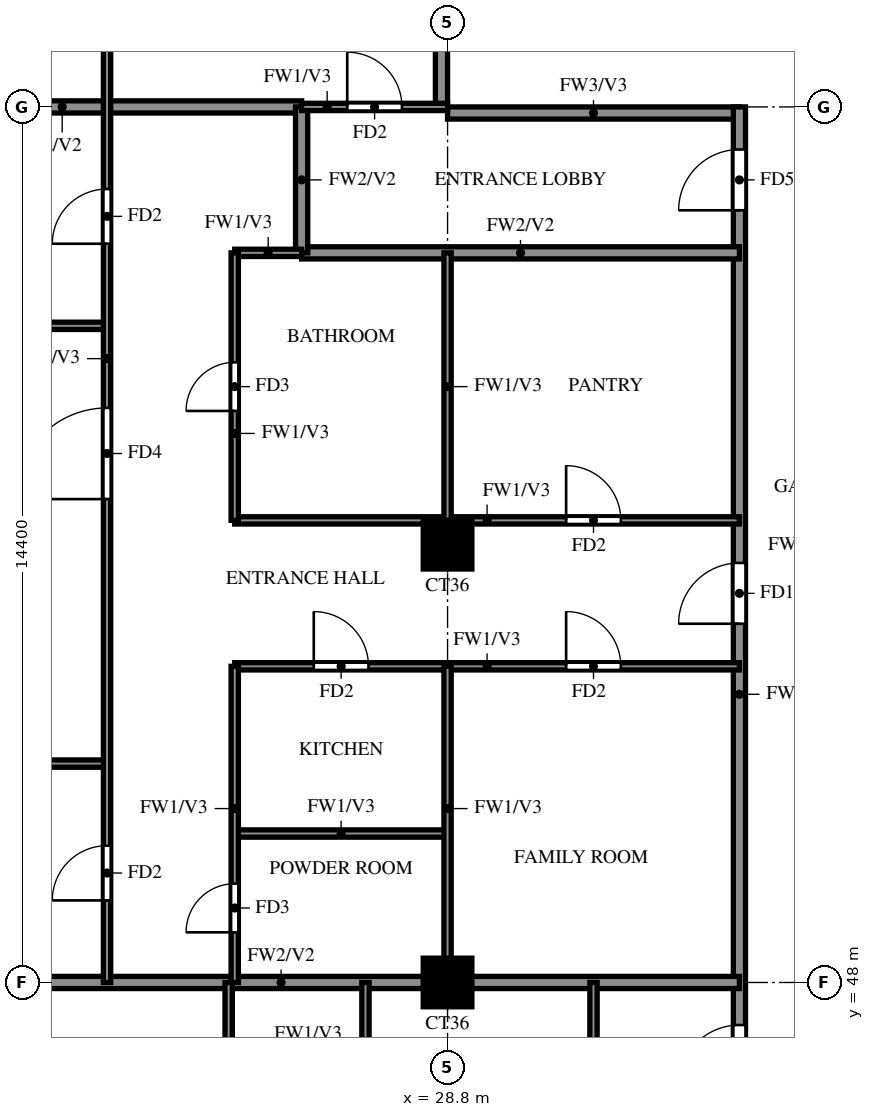
"""IFC4 building model, lengths in metres.
Left out: names, types, materials, properties, quantities, classifications, styles, units other than length and angle.
Written with IfcOpenShell. Run it as: python <this file> out.ifc"""

import sys

from ifc_helpers import new_model, si_unit, direction, frame, frame_2d, origin, origin_2d, place, context, subcontext, project, spatial, rectangle, extrude, source, transform, mapped, element, fill, save


model = new_model("IFC4")
c1 = context("Model", 3, precision=1e-05, world=origin(), true_north=direction((0.0, 1.0)))
c2 = subcontext(c1, "Body", "Model", "MODEL_VIEW")
j1 = project(units=[si_unit("LENGTHUNIT", "METRE"), si_unit("PLANEANGLEUNIT", "RADIAN")], contexts=[c1])
p1 = place(None, origin())
s1 = spatial("IfcSite", under=j1, at=p1, CompositionType="ELEMENT")
p2 = place(p1, origin())
s2 = spatial("IfcBuilding", under=s1, at=p2, CompositionType="ELEMENT")
p3 = place(p2, frame((0.0, 0.0, 246.5)))
s3 = spatial("IfcBuildingStorey", under=s2, at=p3, CompositionType="ELEMENT", Elevation=246.5)
m1 = source(origin(), c2, "Body", "SweptSolid", [
    extrude(rectangle(XDim=0.8, YDim=0.8, at=origin_2d()), origin(), (0.0, 0.0, 1.0), 3.22),
])
for number, where, z_axis, x_axis in (
    (1, (28.8, 48.0, 0.0), (0.0, 0.0, 1.0), (1.0, 0.0, 0.0)),
    (2, (28.8, 55.2, 0.0), (0.0, 0.0, 1.0), (1.0, 0.0, 0.0)),
):
    element("IfcColumn", number, at=place(p3, frame(where, z_axis=z_axis, x_axis=x_axis)), inside=s3, PredefinedType="COLUMN", context=c2, shape_type="MappedRepresentation", body=[
        mapped(m1, transform((0.0, 0.0, 0.0))),
    ])
p4 = place(p3, frame((28.8, 62.3, 0.0), z_axis=(0.0, 0.0, 1.0), x_axis=(1.0, 0.0, 0.0)))
e3 = element("IfcWall", 3, at=p4, inside=s3, PredefinedType="SOLIDWALL", context=c2, shape_type="SweptSolid", body=[
    extrude(rectangle(XDim=4.8, YDim=0.2, at=frame_2d((2.4, 0.0))), origin(), (0.0, 0.0, 1.0), 3.22),
])
p5 = place(p3, frame((28.7, 62.4, 0.0), z_axis=(0.0, 0.0, 1.0), x_axis=(0.0, 1.0, 0.0)))
e4 = element("IfcWall", 4, at=p5, inside=s3, PredefinedType="SOLIDWALL", context=c2, shape_type="SweptSolid", body=[
    extrude(rectangle(XDim=15.6, YDim=0.2, at=frame_2d((7.8, 0.0))), origin(), (0.0, 0.0, 1.0), 3.22),
])
p6 = place(p3, frame((33.6, 45.6, 0.0), z_axis=(0.0, 0.0, 1.0), x_axis=(0.0, 1.0, 0.0)))
e5 = element("IfcWall", 5, at=p6, inside=s3, PredefinedType="SOLIDWALL", context=c2, shape_type="SweptSolid", body=[
    extrude(rectangle(XDim=16.8, YDim=0.2, at=frame_2d((8.4, 0.0))), origin(), (0.0, 0.0, 1.0), 3.22),
])
p7 = place(p6, frame((0.7, 0.0, 0.0)))
e6 = element("IfcOpeningElement", 6, at=p7, cuts=e5, PredefinedType="OPENING", context=c2, shape_type="SweptSolid", body=[
    extrude(rectangle(XDim=1.0, YDim=2.1, at=frame_2d((0.5, 1.05))), frame((0.0, 0.11, 0.0), z_axis=(0.0, -1.0, 0.0), x_axis=(1.0, 0.0, 0.0)), (0.0, 0.0, 1.0), 0.22),
])
p8 = place(p6, frame((8.3, 0.0, 0.0)))
e7 = element("IfcOpeningElement", 7, at=p8, cuts=e5, PredefinedType="OPENING", context=c2, shape_type="SweptSolid", body=[
    extrude(rectangle(XDim=1.0, YDim=2.1, at=frame_2d((0.5, 1.05))), frame((0.0, 0.11, 0.0), z_axis=(0.0, -1.0, 0.0), x_axis=(1.0, 0.0, 0.0)), (0.0, 0.0, 1.0), 0.22),
])
p9 = place(p6, frame((15.1, 0.0, 0.0)))
e8 = element("IfcOpeningElement", 8, at=p9, cuts=e5, PredefinedType="OPENING", context=c2, shape_type="SweptSolid", body=[
    extrude(rectangle(XDim=1.0, YDim=2.1, at=frame_2d((0.5, 1.05))), frame((0.0, 0.11, 0.0), z_axis=(0.0, -1.0, 0.0), x_axis=(1.0, 0.0, 0.0)), (0.0, 0.0, 1.0), 0.22),
])
p10 = place(p3, frame((18.525, 48.0, 0.0), z_axis=(0.0, 0.0, 1.0), x_axis=(1.0, 0.0, 0.0)))
e9 = element("IfcWall", 9, at=p10, inside=s3, PredefinedType="SOLIDWALL", context=c2, shape_type="SweptSolid", body=[
    extrude(rectangle(XDim=15.075, YDim=0.2, at=frame_2d((7.538, 0.0))), origin(), (0.0, 0.0, 1.0), 3.22),
])
p11 = place(p3, frame((26.4, 60.0, 0.0), z_axis=(0.0, 0.0, 1.0), x_axis=(1.0, 0.0, 0.0)))
e10 = element("IfcWall", 10, at=p11, inside=s3, PredefinedType="SOLIDWALL", context=c2, shape_type="SweptSolid", body=[
    extrude(rectangle(XDim=7.2, YDim=0.2, at=frame_2d((3.6, 0.0))), origin(), (0.0, 0.0, 1.0), 3.22),
])
p12 = place(p3, frame((18.525, 62.4, 0.0), z_axis=(0.0, 0.0, 1.0), x_axis=(1.0, 0.0, 0.0)))
e11 = element("IfcWall", 11, at=p12, inside=s3, PredefinedType="SOLIDWALL", context=c2, shape_type="SweptSolid", body=[
    extrude(rectangle(XDim=7.875, YDim=0.2, at=frame_2d((3.938, 0.0))), origin(), (0.0, 0.0, 1.0), 3.22),
])
p13 = place(p3, frame((26.4, 60.0, 0.0), z_axis=(0.0, 0.0, 1.0), x_axis=(0.0, 1.0, 0.0)))
e12 = element("IfcWall", 12, at=p13, inside=s3, PredefinedType="SOLIDWALL", context=c2, shape_type="SweptSolid", body=[
    extrude(rectangle(XDim=2.4, YDim=0.2, at=frame_2d((1.2, 0.0))), origin(), (0.0, 0.0, 1.0), 3.22),
])
p14 = place(p3, frame((25.3, 50.45, 0.0), z_axis=(0.0, 0.0, 1.0), x_axis=(1.0, 0.0, 0.0)))
e13 = element("IfcWall", 13, at=p14, inside=s3, PredefinedType="PARTITIONING", context=c2, shape_type="SweptSolid", body=[
    extrude(rectangle(XDim=3.5, YDim=0.12, at=frame_2d((1.75, 0.0))), origin(), (0.0, 0.0, 1.0), 3.22),
])
p15 = place(p3, frame((18.525, 51.6, 0.0), z_axis=(0.0, 0.0, 1.0), x_axis=(1.0, 0.0, 0.0)))
e14 = element("IfcWall", 14, at=p15, inside=s3, PredefinedType="PARTITIONING", context=c2, shape_type="SweptSolid", body=[
    extrude(rectangle(XDim=4.675, YDim=0.12, at=frame_2d((2.337, 0.0))), origin(), (0.0, 0.0, 1.0), 2.32),
])
p16 = place(p3, frame((25.3, 53.2, 0.0), z_axis=(0.0, 0.0, 1.0), x_axis=(1.0, 0.0, 0.0)))
e15 = element("IfcWall", 15, at=p16, inside=s3, PredefinedType="PARTITIONING", context=c2, shape_type="SweptSolid", body=[
    extrude(rectangle(XDim=8.3, YDim=0.12, at=frame_2d((4.15, 0.0))), origin(), (0.0, 0.0, 1.0), 3.22),
])
p17 = place(p16, frame((1.3, 0.0, 0.0)))
e16 = element("IfcOpeningElement", 16, at=p17, cuts=e15, PredefinedType="OPENING", context=c2, shape_type="SweptSolid", body=[
    extrude(rectangle(XDim=0.9, YDim=2.1, at=frame_2d((0.45, 1.05))), frame((0.0, 0.07, 0.0), z_axis=(0.0, -1.0, 0.0), x_axis=(1.0, 0.0, 0.0)), (0.0, 0.0, 1.0), 0.14),
])
p18 = place(p16, frame((5.45, 0.0, 0.0)))
e17 = element("IfcOpeningElement", 17, at=p18, cuts=e15, PredefinedType="OPENING", context=c2, shape_type="SweptSolid", body=[
    extrude(rectangle(XDim=0.9, YDim=2.1, at=frame_2d((0.45, 1.05))), frame((0.0, 0.07, 0.0), z_axis=(0.0, -1.0, 0.0), x_axis=(1.0, 0.0, 0.0)), (0.0, 0.0, 1.0), 0.14),
])
p19 = place(p3, frame((25.3, 55.6, 0.0), z_axis=(0.0, 0.0, 1.0), x_axis=(1.0, 0.0, 0.0)))
e18 = element("IfcWall", 18, at=p19, inside=s3, PredefinedType="PARTITIONING", context=c2, shape_type="SweptSolid", body=[
    extrude(rectangle(XDim=8.3, YDim=0.12, at=frame_2d((4.15, 0.0))), origin(), (0.0, 0.0, 1.0), 3.22),
])
p20 = place(p19, frame((5.45, 0.0, 0.0)))
e19 = element("IfcOpeningElement", 19, at=p20, cuts=e18, PredefinedType="OPENING", context=c2, shape_type="SweptSolid", body=[
    extrude(rectangle(XDim=0.9, YDim=2.1, at=frame_2d((0.45, 1.05))), frame((0.0, 0.07, 0.0), z_axis=(0.0, -1.0, 0.0), x_axis=(1.0, 0.0, 0.0)), (0.0, 0.0, 1.0), 0.14),
])
p21 = place(p3, frame((18.525, 58.8, 0.0), z_axis=(0.0, 0.0, 1.0), x_axis=(1.0, 0.0, 0.0)))
e20 = element("IfcWall", 20, at=p21, inside=s3, PredefinedType="PARTITIONING", context=c2, shape_type="SweptSolid", body=[
    extrude(rectangle(XDim=4.675, YDim=0.12, at=frame_2d((2.337, 0.0))), origin(), (0.0, 0.0, 1.0), 2.32),
])
p22 = place(p3, frame((25.3, 60.0, 0.0), z_axis=(0.0, 0.0, 1.0), x_axis=(1.0, 0.0, 0.0)))
e21 = element("IfcWall", 21, at=p22, inside=s3, PredefinedType="PARTITIONING", context=c2, shape_type="SweptSolid", body=[
    extrude(rectangle(XDim=1.1, YDim=0.12, at=frame_2d((0.55, 0.0))), origin(), (0.0, 0.0, 1.0), 3.22),
])
p23 = place(p3, frame((26.4, 62.4, 0.0), z_axis=(0.0, 0.0, 1.0), x_axis=(1.0, 0.0, 0.0)))
e22 = element("IfcWall", 22, at=p23, inside=s3, PredefinedType="PARTITIONING", context=c2, shape_type="SweptSolid", body=[
    extrude(rectangle(XDim=2.4, YDim=0.12, at=frame_2d((1.2, 0.0))), origin(), (0.0, 0.0, 1.0), 3.22),
])
p24 = place(p23, frame((0.75, 0.0, 0.0)))
e23 = element("IfcOpeningElement", 23, at=p24, cuts=e22, PredefinedType="OPENING", context=c2, shape_type="SweptSolid", body=[
    extrude(rectangle(XDim=0.9, YDim=2.1, at=frame_2d((0.45, 1.05))), frame((0.0, 0.07, 0.0), z_axis=(0.0, -1.0, 0.0), x_axis=(1.0, 0.0, 0.0)), (0.0, 0.0, 1.0), 0.14),
])
p25 = place(p3, frame((23.2, 48.0, 0.0), z_axis=(0.0, 0.0, 1.0), x_axis=(0.0, 1.0, 0.0)))
e24 = element("IfcWall", 24, at=p25, inside=s3, PredefinedType="PARTITIONING", context=c2, shape_type="SweptSolid", body=[
    extrude(rectangle(XDim=21.6, YDim=0.12, at=frame_2d((10.8, 0.0))), origin(), (0.0, 0.0, 1.0), 3.22),
])
p26 = place(p25, frame((1.35, 0.0, 0.0)))
e25 = element("IfcOpeningElement", 25, at=p26, cuts=e24, PredefinedType="OPENING", context=c2, shape_type="SweptSolid", body=[
    extrude(rectangle(XDim=0.9, YDim=2.1, at=frame_2d((0.45, 1.05))), frame((0.0, 0.07, 0.0), z_axis=(0.0, -1.0, 0.0), x_axis=(1.0, 0.0, 0.0)), (0.0, 0.0, 1.0), 0.14),
])
p27 = place(p25, frame((7.95, 0.0, 0.0)))
e26 = element("IfcOpeningElement", 26, at=p27, cuts=e24, PredefinedType="OPENING", context=c2, shape_type="SweptSolid", body=[
    extrude(rectangle(XDim=1.5, YDim=2.1, at=frame_2d((0.75, 1.05))), frame((0.0, 0.07, 0.0), z_axis=(0.0, -1.0, 0.0), x_axis=(1.0, 0.0, 0.0)), (0.0, 0.0, 1.0), 0.14),
])
p28 = place(p25, frame((12.15, 0.0, 0.0)))
e27 = element("IfcOpeningElement", 27, at=p28, cuts=e24, PredefinedType="OPENING", context=c2, shape_type="SweptSolid", body=[
    extrude(rectangle(XDim=0.9, YDim=2.1, at=frame_2d((0.45, 1.05))), frame((0.0, 0.07, 0.0), z_axis=(0.0, -1.0, 0.0), x_axis=(1.0, 0.0, 0.0)), (0.0, 0.0, 1.0), 0.14),
])
p29 = place(p25, frame((15.75, 0.0, 0.0)))
e28 = element("IfcOpeningElement", 28, at=p29, cuts=e24, PredefinedType="OPENING", context=c2, shape_type="SweptSolid", body=[
    extrude(rectangle(XDim=0.9, YDim=2.1, at=frame_2d((0.45, 1.05))), frame((0.0, 0.07, 0.0), z_axis=(0.0, -1.0, 0.0), x_axis=(1.0, 0.0, 0.0)), (0.0, 0.0, 1.0), 0.14),
])
p30 = place(p25, frame((19.35, 0.0, 0.0)))
e29 = element("IfcOpeningElement", 29, at=p30, cuts=e24, PredefinedType="OPENING", context=c2, shape_type="SweptSolid", body=[
    extrude(rectangle(XDim=0.9, YDim=2.1, at=frame_2d((0.45, 1.05))), frame((0.0, 0.07, 0.0), z_axis=(0.0, -1.0, 0.0), x_axis=(1.0, 0.0, 0.0)), (0.0, 0.0, 1.0), 0.14),
])
p31 = place(p3, frame((25.2, 39.725, 0.0), z_axis=(0.0, 0.0, 1.0), x_axis=(0.0, 1.0, 0.0)))
e30 = element("IfcWall", 30, at=p31, inside=s3, PredefinedType="PARTITIONING", context=c2, shape_type="SweptSolid", body=[
    extrude(rectangle(XDim=8.275, YDim=0.12, at=frame_2d((4.137, 0.0))), origin(), (0.0, 0.0, 1.0), 3.22),
])
p32 = place(p31, frame((4.525, 0.0, 0.0)))
e31 = element("IfcOpeningElement", 31, at=p32, cuts=e30, PredefinedType="OPENING", context=c2, shape_type="SweptSolid", body=[
    extrude(rectangle(XDim=0.9, YDim=2.1, at=frame_2d((0.45, 1.05))), frame((0.0, 0.07, 0.0), z_axis=(0.0, -1.0, 0.0), x_axis=(1.0, 0.0, 0.0)), (0.0, 0.0, 1.0), 0.14),
])
p33 = place(p3, frame((25.3, 48.0, 0.0), z_axis=(0.0, 0.0, 1.0), x_axis=(0.0, 1.0, 0.0)))
e32 = element("IfcWall", 32, at=p33, inside=s3, PredefinedType="PARTITIONING", context=c2, shape_type="SweptSolid", body=[
    extrude(rectangle(XDim=5.2, YDim=0.12, at=frame_2d((2.6, 0.0))), origin(), (0.0, 0.0, 1.0), 3.22),
])
p34 = place(p33, frame((0.825, 0.0, 0.0)))
e33 = element("IfcOpeningElement", 33, at=p34, cuts=e32, PredefinedType="OPENING", context=c2, shape_type="SweptSolid", body=[
    extrude(rectangle(XDim=0.8, YDim=2.1, at=frame_2d((0.4, 1.05))), frame((0.0, 0.07, 0.0), z_axis=(0.0, -1.0, 0.0), x_axis=(1.0, 0.0, 0.0)), (0.0, 0.0, 1.0), 0.14),
])
p35 = place(p3, frame((25.3, 55.6, 0.0), z_axis=(0.0, 0.0, 1.0), x_axis=(0.0, 1.0, 0.0)))
e34 = element("IfcWall", 34, at=p35, inside=s3, PredefinedType="PARTITIONING", context=c2, shape_type="SweptSolid", body=[
    extrude(rectangle(XDim=4.4, YDim=0.12, at=frame_2d((2.2, 0.0))), origin(), (0.0, 0.0, 1.0), 3.22),
])
p36 = place(p35, frame((1.8, 0.0, 0.0)))
e35 = element("IfcOpeningElement", 35, at=p36, cuts=e34, PredefinedType="OPENING", context=c2, shape_type="SweptSolid", body=[
    extrude(rectangle(XDim=0.8, YDim=2.1, at=frame_2d((0.4, 1.05))), frame((0.0, 0.07, 0.0), z_axis=(0.0, -1.0, 0.0), x_axis=(1.0, 0.0, 0.0)), (0.0, 0.0, 1.0), 0.14),
])
p37 = place(p3, frame((27.45, 45.6, 0.0), z_axis=(0.0, 0.0, 1.0), x_axis=(0.0, 1.0, 0.0)))
e36 = element("IfcWall", 36, at=p37, inside=s3, PredefinedType="PARTITIONING", context=c2, shape_type="SweptSolid", body=[
    extrude(rectangle(XDim=2.4, YDim=0.12, at=frame_2d((1.2, 0.0))), origin(), (0.0, 0.0, 1.0), 3.22),
])
p38 = place(p3, frame((28.8, 48.0, 0.0), z_axis=(0.0, 0.0, 1.0), x_axis=(0.0, 1.0, 0.0)))
e37 = element("IfcWall", 37, at=p38, inside=s3, PredefinedType="PARTITIONING", context=c2, shape_type="SweptSolid", body=[
    extrude(rectangle(XDim=5.2, YDim=0.12, at=frame_2d((2.6, 0.0))), origin(), (0.0, 0.0, 1.0), 3.22),
])
p39 = place(p3, frame((28.8, 55.6, 0.0), z_axis=(0.0, 0.0, 1.0), x_axis=(0.0, 1.0, 0.0)))
e38 = element("IfcWall", 38, at=p39, inside=s3, PredefinedType="PARTITIONING", context=c2, shape_type="SweptSolid", body=[
    extrude(rectangle(XDim=4.4, YDim=0.12, at=frame_2d((2.2, 0.0))), origin(), (0.0, 0.0, 1.0), 3.22),
])
p40 = place(p3, frame((31.2, 45.6, 0.0), z_axis=(0.0, 0.0, 1.0), x_axis=(0.0, 1.0, 0.0)))
e39 = element("IfcWall", 39, at=p40, inside=s3, PredefinedType="PARTITIONING", context=c2, shape_type="SweptSolid", body=[
    extrude(rectangle(XDim=2.4, YDim=0.12, at=frame_2d((1.2, 0.0))), origin(), (0.0, 0.0, 1.0), 3.22),
])
p41 = place(p7, origin())
e40 = element("IfcDoor", 40, at=p41, inside=s3, OperationType="SINGLE_SWING_RIGHT", PredefinedType="DOOR", context=c2, shape_type="SweptSolid", body=[
    extrude(rectangle(XDim=1.0, YDim=2.1, at=frame_2d((0.5, 1.05))), frame((0.0, 0.025, 0.0), z_axis=(0.0, -1.0, 0.0), x_axis=(1.0, 0.0, 0.0)), (0.0, 0.0, 1.0), 0.05),
])
fill(e6, e40)
p42 = place(p8, origin())
e41 = element("IfcDoor", 41, at=p42, inside=s3, OperationType="SINGLE_SWING_LEFT", PredefinedType="DOOR", context=c2, shape_type="SweptSolid", body=[
    extrude(rectangle(XDim=1.0, YDim=2.1, at=frame_2d((0.5, 1.05))), frame((0.0, 0.025, 0.0), z_axis=(0.0, -1.0, 0.0), x_axis=(1.0, 0.0, 0.0)), (0.0, 0.0, 1.0), 0.05),
])
fill(e7, e41)
p43 = place(p26, origin())
e42 = element("IfcDoor", 42, at=p43, inside=s3, OperationType="SINGLE_SWING_LEFT", PredefinedType="DOOR", context=c2, shape_type="SweptSolid", body=[
    extrude(rectangle(XDim=0.9, YDim=2.1, at=frame_2d((0.45, 1.05))), frame((0.0, 0.025, 0.0), z_axis=(0.0, -1.0, 0.0), x_axis=(1.0, 0.0, 0.0)), (0.0, 0.0, 1.0), 0.05),
])
fill(e25, e42)
p44 = place(p27, origin())
e43 = element("IfcDoor", 43, at=p44, inside=s3, OperationType="SINGLE_SWING_LEFT", PredefinedType="DOOR", context=c2, shape_type="SweptSolid", body=[
    extrude(rectangle(XDim=1.5, YDim=2.1, at=frame_2d((0.75, 1.05))), frame((0.0, 0.025, 0.0), z_axis=(0.0, -1.0, 0.0), x_axis=(1.0, 0.0, 0.0)), (0.0, 0.0, 1.0), 0.05),
])
fill(e26, e43)
p45 = place(p28, origin())
e44 = element("IfcDoor", 44, at=p45, inside=s3, OperationType="SINGLE_SWING_LEFT", PredefinedType="DOOR", context=c2, shape_type="SweptSolid", body=[
    extrude(rectangle(XDim=0.9, YDim=2.1, at=frame_2d((0.45, 1.05))), frame((0.0, 0.025, 0.0), z_axis=(0.0, -1.0, 0.0), x_axis=(1.0, 0.0, 0.0)), (0.0, 0.0, 1.0), 0.05),
])
fill(e27, e44)
p46 = place(p34, origin())
e45 = element("IfcDoor", 45, at=p46, inside=s3, OperationType="SINGLE_SWING_LEFT", PredefinedType="DOOR", context=c2, shape_type="SweptSolid", body=[
    extrude(rectangle(XDim=0.8, YDim=2.1, at=frame_2d((0.4, 1.05))), frame((0.0, 0.025, 0.0), z_axis=(0.0, -1.0, 0.0), x_axis=(1.0, 0.0, 0.0)), (0.0, 0.0, 1.0), 0.05),
])
fill(e33, e45)
p47 = place(p17, origin())
e46 = element("IfcDoor", 46, at=p47, inside=s3, OperationType="SINGLE_SWING_RIGHT", PredefinedType="DOOR", context=c2, shape_type="SweptSolid", body=[
    extrude(rectangle(XDim=0.9, YDim=2.1, at=frame_2d((0.45, 1.05))), frame((0.0, 0.025, 0.0), z_axis=(0.0, -1.0, 0.0), x_axis=(1.0, 0.0, 0.0)), (0.0, 0.0, 1.0), 0.05),
])
fill(e16, e46)
p48 = place(p36, origin())
e47 = element("IfcDoor", 47, at=p48, inside=s3, OperationType="SINGLE_SWING_LEFT", PredefinedType="DOOR", context=c2, shape_type="SweptSolid", body=[
    extrude(rectangle(XDim=0.8, YDim=2.1, at=frame_2d((0.4, 1.05))), frame((0.0, 0.025, 0.0), z_axis=(0.0, -1.0, 0.0), x_axis=(1.0, 0.0, 0.0)), (0.0, 0.0, 1.0), 0.05),
])
fill(e35, e47)
p49 = place(p18, origin())
e48 = element("IfcDoor", 48, at=p49, inside=s3, OperationType="SINGLE_SWING_LEFT", PredefinedType="DOOR", context=c2, shape_type="SweptSolid", body=[
    extrude(rectangle(XDim=0.9, YDim=2.1, at=frame_2d((0.45, 1.05))), frame((0.0, 0.025, 0.0), z_axis=(0.0, -1.0, 0.0), x_axis=(1.0, 0.0, 0.0)), (0.0, 0.0, 1.0), 0.05),
])
fill(e17, e48)
p50 = place(p20, origin())
e49 = element("IfcDoor", 49, at=p50, inside=s3, OperationType="SINGLE_SWING_RIGHT", PredefinedType="DOOR", context=c2, shape_type="SweptSolid", body=[
    extrude(rectangle(XDim=0.9, YDim=2.1, at=frame_2d((0.45, 1.05))), frame((0.0, 0.025, 0.0), z_axis=(0.0, -1.0, 0.0), x_axis=(1.0, 0.0, 0.0)), (0.0, 0.0, 1.0), 0.05),
])
fill(e19, e49)
p51 = place(p24, origin())
e50 = element("IfcDoor", 50, at=p51, inside=s3, OperationType="SINGLE_SWING_LEFT", PredefinedType="DOOR", context=c2, shape_type="SweptSolid", body=[
    extrude(rectangle(XDim=0.9, YDim=2.1, at=frame_2d((0.45, 1.05))), frame((0.0, 0.025, 0.0), z_axis=(0.0, -1.0, 0.0), x_axis=(1.0, 0.0, 0.0)), (0.0, 0.0, 1.0), 0.05),
])
fill(e23, e50)
p52 = place(p9, origin())
e51 = element("IfcDoor", 51, at=p52, inside=s3, OperationType="SINGLE_SWING_LEFT", PredefinedType="DOOR", context=c2, shape_type="SweptSolid", body=[
    extrude(rectangle(XDim=1.0, YDim=2.1, at=frame_2d((0.5, 1.05))), frame((0.0, 0.025, 0.0), z_axis=(0.0, -1.0, 0.0), x_axis=(1.0, 0.0, 0.0)), (0.0, 0.0, 1.0), 0.05),
])
fill(e8, e51)
save(model, sys.argv[1])
